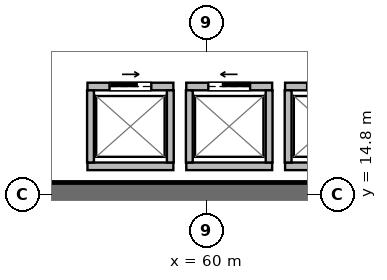
"""IFC4 building model, lengths in metres.
Left out: names, types, materials, properties, quantities, classifications, styles, units other than length and angle.
Written with IfcOpenShell. Run it as: python <this file> out.ifc"""

import sys

from ifc_helpers import new_model, si_unit, direction, frame, frame_2d, origin, place, context, subcontext, project, spatial, rectangle, extrude, source, transform, mapped, element, fill, save


model = new_model("IFC4")
c1 = context("Model", 3, precision=1e-05, world=origin(), true_north=direction((0.0, 1.0)))
c2 = subcontext(c1, "Body", "Model", "MODEL_VIEW")
j1 = project(units=[si_unit("LENGTHUNIT", "METRE"), si_unit("PLANEANGLEUNIT", "RADIAN")], contexts=[c1])
p1 = place(None, origin())
s1 = spatial("IfcSite", under=j1, at=p1, CompositionType="ELEMENT")
p2 = place(p1, origin())
s2 = spatial("IfcBuilding", under=s1, at=p2, CompositionType="ELEMENT")
p3 = place(p2, frame((0.0, 0.0, 100.3)))
s3 = spatial("IfcBuildingStorey", under=s2, at=p3, CompositionType="ELEMENT", Elevation=100.3)
p4 = place(p3, frame((52.275, 14.8, 0.0), z_axis=(0.0, 0.0, 1.0), x_axis=(1.0, 0.0, 0.0)))
e1 = element("IfcWall", 1, at=p4, inside=s3, PredefinedType="SHEAR", context=c2, shape_type="SweptSolid", body=[
    extrude(rectangle(XDim=15.45, YDim=0.65, at=frame_2d((7.725, 0.0))), origin(), (0.0, 0.0, 1.0), 4.49),
])
p5 = place(p3, frame((62.07, 17.65, 0.0), z_axis=(0.0, 0.0, 1.0), x_axis=(1.0, 0.0, 0.0)))
e2 = element("IfcWall", 2, at=p5, inside=s3, PredefinedType="SOLIDWALL", context=c2, shape_type="SweptSolid", body=[
    extrude(rectangle(XDim=2.26, YDim=0.2, at=frame_2d((1.13, 0.0))), origin(), (0.0, 0.0, 1.0), 4.49),
])
p6 = place(p5, frame((0.58, 0.0, 0.0)))
e3 = element("IfcOpeningElement", 3, at=p6, cuts=e2, PredefinedType="OPENING", context=c2, shape_type="SweptSolid", body=[
    extrude(rectangle(XDim=1.1, YDim=2.22, at=frame_2d((0.55, 1.11))), frame((0.0, 0.11, 0.0), z_axis=(0.0, -1.0, 0.0), x_axis=(1.0, 0.0, 0.0)), (0.0, 0.0, 1.0), 0.22),
])
p7 = place(p3, frame((62.07, 15.55, 0.0), z_axis=(0.0, 0.0, 1.0), x_axis=(1.0, 0.0, 0.0)))
e4 = element("IfcWall", 4, at=p7, inside=s3, PredefinedType="SOLIDWALL", context=c2, shape_type="SweptSolid", body=[
    extrude(rectangle(XDim=2.26, YDim=0.2, at=frame_2d((1.13, 0.0))), origin(), (0.0, 0.0, 1.0), 4.49),
])
p8 = place(p3, frame((62.15, 15.65, 0.0), z_axis=(0.0, 0.0, 1.0), x_axis=(0.0, 1.0, 0.0)))
e5 = element("IfcWall", 5, at=p8, inside=s3, PredefinedType="SOLIDWALL", context=c2, shape_type="SweptSolid", body=[
    extrude(rectangle(XDim=1.9, YDim=0.18, at=frame_2d((0.95, 0.0))), origin(), (0.0, 0.0, 1.0), 4.49),
])
p9 = place(p3, frame((59.47, 17.65, 0.0), z_axis=(0.0, 0.0, 1.0), x_axis=(1.0, 0.0, 0.0)))
e6 = element("IfcWall", 6, at=p9, inside=s3, PredefinedType="SOLIDWALL", context=c2, shape_type="SweptSolid", body=[
    extrude(rectangle(XDim=2.26, YDim=0.2, at=frame_2d((1.13, 0.0))), origin(), (0.0, 0.0, 1.0), 3.825),
])
p10 = place(p9, frame((0.58, 0.0, 0.0)))
e7 = element("IfcOpeningElement", 7, at=p10, cuts=e6, PredefinedType="OPENING", context=c2, shape_type="SweptSolid", body=[
    extrude(rectangle(XDim=1.1, YDim=2.22, at=frame_2d((0.55, 1.11))), frame((0.0, 0.11, 0.0), z_axis=(0.0, -1.0, 0.0), x_axis=(1.0, 0.0, 0.0)), (0.0, 0.0, 1.0), 0.22),
])
p11 = place(p3, frame((59.47, 15.55, 0.0), z_axis=(0.0, 0.0, 1.0), x_axis=(1.0, 0.0, 0.0)))
e8 = element("IfcWall", 8, at=p11, inside=s3, PredefinedType="SOLIDWALL", context=c2, shape_type="SweptSolid", body=[
    extrude(rectangle(XDim=2.26, YDim=0.2, at=frame_2d((1.13, 0.0))), origin(), (0.0, 0.0, 1.0), 3.825),
])
for number, where, z_axis, x_axis in (
    (9, (59.55, 15.65, 0.0), (0.0, 0.0, 1.0), (0.0, 1.0, 0.0)),
    (10, (61.65, 15.65, 0.0), (0.0, 0.0, 1.0), (0.0, 1.0, 0.0)),
):
    element("IfcWall", number, at=place(p3, frame(where, z_axis=z_axis, x_axis=x_axis)), inside=s3, PredefinedType="SOLIDWALL", context=c2, shape_type="SweptSolid", body=[
        extrude(rectangle(XDim=1.9, YDim=0.18, at=frame_2d((0.95, 0.0))), origin(), (0.0, 0.0, 1.0), 4.49),
    ])
p12 = place(p3, frame((56.87, 17.65, 0.0), z_axis=(0.0, 0.0, 1.0), x_axis=(1.0, 0.0, 0.0)))
e11 = element("IfcWall", 11, at=p12, inside=s3, PredefinedType="SOLIDWALL", context=c2, shape_type="SweptSolid", body=[
    extrude(rectangle(XDim=2.26, YDim=0.2, at=frame_2d((1.13, 0.0))), origin(), (0.0, 0.0, 1.0), 4.49),
])
p13 = place(p12, frame((0.58, 0.0, 0.0)))
e12 = element("IfcOpeningElement", 12, at=p13, cuts=e11, PredefinedType="OPENING", context=c2, shape_type="SweptSolid", body=[
    extrude(rectangle(XDim=1.1, YDim=2.22, at=frame_2d((0.55, 1.11))), frame((0.0, 0.11, 0.0), z_axis=(0.0, -1.0, 0.0), x_axis=(1.0, 0.0, 0.0)), (0.0, 0.0, 1.0), 0.22),
])
p14 = place(p3, frame((56.87, 15.55, 0.0), z_axis=(0.0, 0.0, 1.0), x_axis=(1.0, 0.0, 0.0)))
e13 = element("IfcWall", 13, at=p14, inside=s3, PredefinedType="SOLIDWALL", context=c2, shape_type="SweptSolid", body=[
    extrude(rectangle(XDim=2.26, YDim=0.2, at=frame_2d((1.13, 0.0))), origin(), (0.0, 0.0, 1.0), 4.49),
])
for number, where, z_axis, x_axis in (
    (14, (56.95, 15.65, 0.0), (0.0, 0.0, 1.0), (0.0, 1.0, 0.0)),
    (15, (59.05, 15.65, 0.0), (0.0, 0.0, 1.0), (0.0, 1.0, 0.0)),
):
    element("IfcWall", number, at=place(p3, frame(where, z_axis=z_axis, x_axis=x_axis)), inside=s3, PredefinedType="SOLIDWALL", context=c2, shape_type="SweptSolid", body=[
        extrude(rectangle(XDim=1.9, YDim=0.18, at=frame_2d((0.95, 0.0))), origin(), (0.0, 0.0, 1.0), 4.49),
    ])
m1 = source(origin(), c2, "Body", "SweptSolid", [
    extrude(rectangle(XDim=1.1, YDim=2.22, at=frame_2d((0.55, 1.11))), frame((0.0, 0.025, 0.0), z_axis=(0.0, -1.0, 0.0), x_axis=(1.0, 0.0, 0.0)), (0.0, 0.0, 1.0), 0.05),
])
p15 = place(p10, origin())
e16 = element("IfcDoor", 16, at=p15, inside=s3, OperationType="SLIDING_TO_LEFT", PredefinedType="USERDEFINED", context=c2, shape_type="MappedRepresentation", body=[
    mapped(m1, transform((0.0, 0.0, 0.0), scale=1.0)),
])
fill(e7, e16)
p16 = place(p13, origin())
e17 = element("IfcDoor", 17, at=p16, inside=s3, OperationType="SLIDING_TO_RIGHT", PredefinedType="USERDEFINED", context=c2, shape_type="MappedRepresentation", body=[
    mapped(m1, transform((0.0, 0.0, 0.0), scale=1.0)),
])
fill(e12, e17)
save(model, sys.argv[1])
